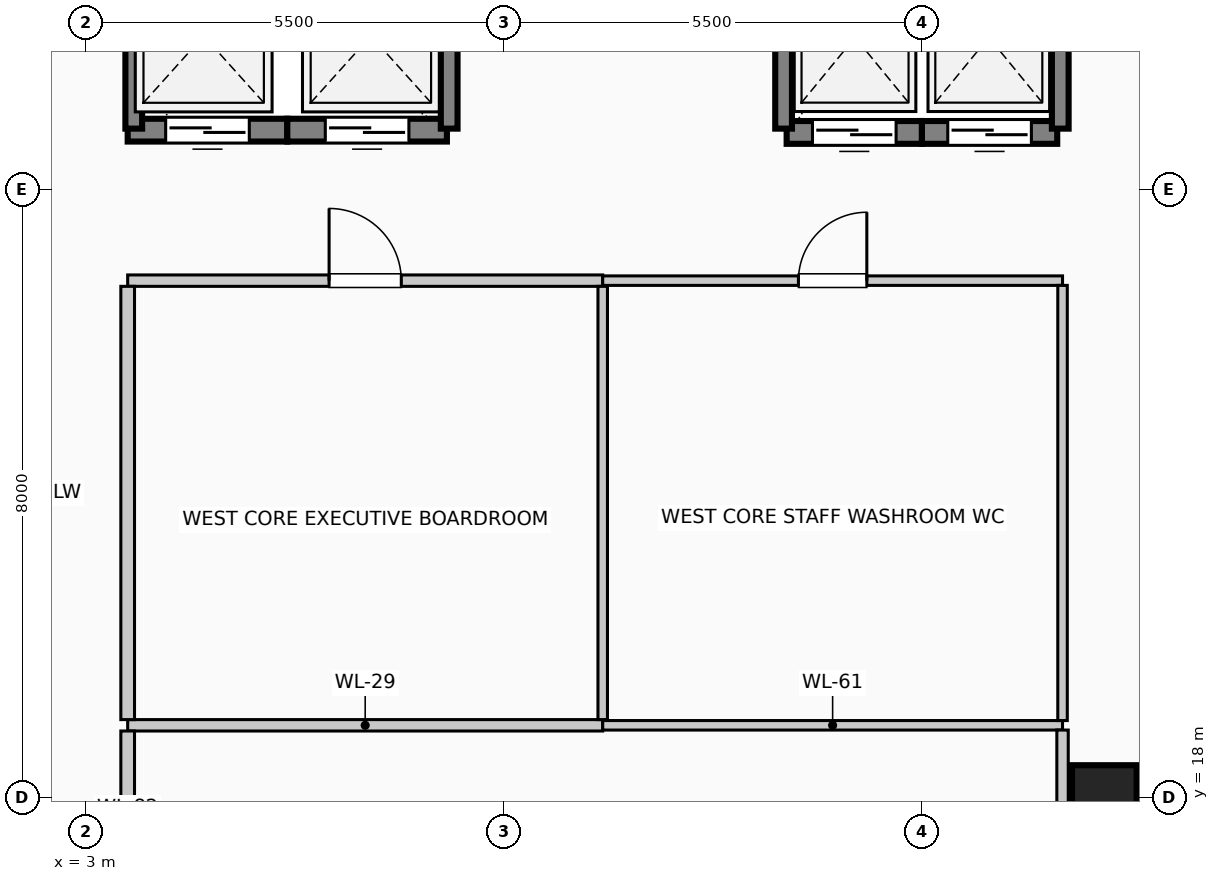
"""IFC4 building model, lengths in metres.
Left out: names, types, materials, properties, quantities, classifications, styles, units other than length and angle.
Written with IfcOpenShell. Run it as: python <this file> out.ifc"""

import sys

from ifc_helpers import new_model, si_unit, direction, frame, frame_2d, origin, origin_2d, place, context, subcontext, project, spatial, rectangle, circle, extrude, element, fill, save


model = new_model("IFC4")
c1 = context("Model", 3, precision=1e-05, world=origin(), true_north=direction((0.0, 1.0)))
c2 = subcontext(c1, "Body", "Model", "MODEL_VIEW")
j1 = project(units=[si_unit("LENGTHUNIT", "METRE"), si_unit("PLANEANGLEUNIT", "RADIAN")], contexts=[c1])
p1 = place(None, origin())
s1 = spatial("IfcSite", under=j1, at=p1, CompositionType="ELEMENT")
p2 = place(p1, origin())
s2 = spatial("IfcBuilding", under=s1, at=p2, CompositionType="ELEMENT")
p3 = place(p2, frame((0.0, 0.0, 165.8)))
s3 = spatial("IfcBuildingStorey", under=s2, at=p3, CompositionType="ELEMENT", Elevation=165.8)
p4 = place(p3, frame((16.4, 18.0, 0.0), z_axis=(0.0, 0.0, 1.0), x_axis=(1.0, 0.0, 0.0)))
e1 = element("IfcColumn", 1, at=p4, inside=s3, PredefinedType="COLUMN", context=c2, shape_type="SweptSolid", body=[
    extrude(circle(Radius=0.425, at=origin_2d()), origin(), (0.0, 0.0, 1.0), 4.8),
])
p5 = place(p3, frame((14.0, 26.75, 0.0), z_axis=(0.0, 0.0, 1.0), x_axis=(-1.0, 0.0, 0.0)))
e2 = element("IfcWall", 2, at=p5, inside=s3, PredefinedType="SOLIDWALL", context=c2, shape_type="SweptSolid", body=[
    extrude(rectangle(XDim=1.78, YDim=0.3, at=frame_2d((0.89, 0.0))), origin(), (0.0, 0.0, 1.0), 4.8),
])
p6 = place(p5, frame((0.34, 0.0, 0.0)))
e3 = element("IfcOpeningElement", 3, at=p6, cuts=e2, PredefinedType="OPENING", context=c2, shape_type="SweptSolid", body=[
    extrude(rectangle(XDim=1.1, YDim=2.2, at=frame_2d((0.55, 1.1))), frame((0.0, 0.16, 0.0), z_axis=(0.0, -1.0, 0.0), x_axis=(1.0, 0.0, 0.0)), (0.0, 0.0, 1.0), 0.32),
])
p7 = place(p3, frame((15.78, 26.75, 0.0), z_axis=(0.0, 0.0, 1.0), x_axis=(-1.0, 0.0, 0.0)))
e4 = element("IfcWall", 4, at=p7, inside=s3, PredefinedType="SOLIDWALL", context=c2, shape_type="SweptSolid", body=[
    extrude(rectangle(XDim=1.78, YDim=0.3, at=frame_2d((0.89, 0.0))), origin(), (0.0, 0.0, 1.0), 4.8),
])
p8 = place(p7, frame((0.34, 0.0, 0.0)))
e5 = element("IfcOpeningElement", 5, at=p8, cuts=e4, PredefinedType="OPENING", context=c2, shape_type="SweptSolid", body=[
    extrude(rectangle(XDim=1.1, YDim=2.2, at=frame_2d((0.55, 1.1))), frame((0.0, 0.16, 0.0), z_axis=(0.0, -1.0, 0.0), x_axis=(1.0, 0.0, 0.0)), (0.0, 0.0, 1.0), 0.32),
])
p9 = place(p3, frame((5.65, 26.78, 0.0), z_axis=(0.0, 0.0, 1.0), x_axis=(-1.0, 0.0, 0.0)))
e6 = element("IfcWall", 6, at=p9, inside=s3, PredefinedType="SOLIDWALL", context=c2, shape_type="SweptSolid", body=[
    extrude(rectangle(XDim=2.1, YDim=0.3, at=frame_2d((1.05, 0.0))), origin(), (0.0, 0.0, 1.0), 4.8),
])
p10 = place(p9, frame((0.5, 0.0, 0.0)))
e7 = element("IfcOpeningElement", 7, at=p10, cuts=e6, PredefinedType="OPENING", context=c2, shape_type="SweptSolid", body=[
    extrude(rectangle(XDim=1.1, YDim=2.2, at=frame_2d((0.55, 1.1))), frame((0.0, 0.16, 0.0), z_axis=(0.0, -1.0, 0.0), x_axis=(1.0, 0.0, 0.0)), (0.0, 0.0, 1.0), 0.32),
])
p11 = place(p3, frame((7.75, 26.78, 0.0), z_axis=(0.0, 0.0, 1.0), x_axis=(-1.0, 0.0, 0.0)))
e8 = element("IfcWall", 8, at=p11, inside=s3, PredefinedType="SOLIDWALL", context=c2, shape_type="SweptSolid", body=[
    extrude(rectangle(XDim=2.1, YDim=0.3, at=frame_2d((1.05, 0.0))), origin(), (0.0, 0.0, 1.0), 4.8),
])
p12 = place(p11, frame((0.5, 0.0, 0.0)))
e9 = element("IfcOpeningElement", 9, at=p12, cuts=e8, PredefinedType="OPENING", context=c2, shape_type="SweptSolid", body=[
    extrude(rectangle(XDim=1.1, YDim=2.2, at=frame_2d((0.55, 1.1))), frame((0.0, 0.16, 0.0), z_axis=(0.0, -1.0, 0.0), x_axis=(1.0, 0.0, 0.0)), (0.0, 0.0, 1.0), 0.32),
])
p13 = place(p3, frame((3.63, 26.8, 0.0), z_axis=(0.0, 0.0, 1.0), x_axis=(0.0, 1.0, 0.0)))
e10 = element("IfcWall", 10, at=p13, inside=s3, PredefinedType="SOLIDWALL", context=c2, shape_type="SweptSolid", body=[
    extrude(rectangle(XDim=5.55, YDim=0.22, at=frame_2d((2.775, 0.0))), origin(), (0.0, 0.0, 1.0), 4.8),
])
p14 = place(p3, frame((7.78, 26.8, 0.0), z_axis=(0.0, 0.0, 1.0), x_axis=(0.0, 1.0, 0.0)))
e11 = element("IfcWall", 11, at=p14, inside=s3, PredefinedType="SOLIDWALL", context=c2, shape_type="SweptSolid", body=[
    extrude(rectangle(XDim=2.8, YDim=0.22, at=frame_2d((1.4, 0.0))), origin(), (0.0, 0.0, 1.0), 4.8),
])
for number, where, z_axis, x_axis in (
    (12, (12.18, 26.8, 0.0), (0.0, 0.0, 1.0), (0.0, 1.0, 0.0)),
    (13, (15.82, 26.8, 0.0), (0.0, 0.0, 1.0), (0.0, 1.0, 0.0)),
):
    element("IfcWall", number, at=place(p3, frame(where, z_axis=z_axis, x_axis=x_axis)), inside=s3, PredefinedType="SOLIDWALL", context=c2, shape_type="SweptSolid", body=[
        extrude(rectangle(XDim=5.45, YDim=0.22, at=frame_2d((2.725, 0.0))), origin(), (0.0, 0.0, 1.0), 4.8),
    ])
p15 = place(p3, frame((3.55, 18.95, 0.0), z_axis=(0.0, 0.0, 1.0), x_axis=(1.0, 0.0, 0.0)))
e14 = element("IfcWall", 14, at=p15, inside=s3, PredefinedType="PARTITIONING", context=c2, shape_type="SweptSolid", body=[
    extrude(rectangle(XDim=6.25, YDim=0.15, at=frame_2d((3.125, 0.0))), origin(), (0.0, 0.0, 1.0), 4.525),
])
p16 = place(p3, frame((9.8, 18.95, 0.0), z_axis=(0.0, 0.0, 1.0), x_axis=(1.0, 0.0, 0.0)))
e15 = element("IfcWall", 15, at=p16, inside=s3, PredefinedType="PARTITIONING", context=c2, shape_type="SweptSolid", body=[
    extrude(rectangle(XDim=6.05, YDim=0.125, at=frame_2d((3.025, 0.0))), origin(), (0.0, 0.0, 1.0), 4.525),
])
p17 = place(p3, frame((3.55, 24.8, 0.0), z_axis=(0.0, 0.0, 1.0), x_axis=(1.0, 0.0, 0.0)))
e16 = element("IfcWall", 16, at=p17, inside=s3, PredefinedType="PARTITIONING", context=c2, shape_type="SweptSolid", body=[
    extrude(rectangle(XDim=6.25, YDim=0.15, at=frame_2d((3.125, 0.0))), origin(), (0.0, 0.0, 1.0), 4.525),
])
p18 = place(p17, frame((2.65, 0.0, 0.0)))
e17 = element("IfcOpeningElement", 17, at=p18, cuts=e16, PredefinedType="OPENING", context=c2, shape_type="SweptSolid", body=[
    extrude(rectangle(XDim=0.95, YDim=2.15, at=frame_2d((0.475, 1.075))), frame((0.0, 0.085, 0.0), z_axis=(0.0, -1.0, 0.0), x_axis=(1.0, 0.0, 0.0)), (0.0, 0.0, 1.0), 0.17),
])
p19 = place(p3, frame((9.8, 24.8, 0.0), z_axis=(0.0, 0.0, 1.0), x_axis=(1.0, 0.0, 0.0)))
e18 = element("IfcWall", 18, at=p19, inside=s3, PredefinedType="PARTITIONING", context=c2, shape_type="SweptSolid", body=[
    extrude(rectangle(XDim=6.05, YDim=0.125, at=frame_2d((3.025, 0.0))), origin(), (0.0, 0.0, 1.0), 4.525),
])
p20 = place(p19, frame((2.575, 0.0, 0.0)))
e19 = element("IfcOpeningElement", 19, at=p20, cuts=e18, PredefinedType="OPENING", context=c2, shape_type="SweptSolid", body=[
    extrude(rectangle(XDim=0.9, YDim=2.1, at=frame_2d((0.45, 1.05))), frame((0.0, 0.073, 0.0), z_axis=(0.0, -1.0, 0.0), x_axis=(1.0, 0.0, 0.0)), (0.0, 0.0, 1.0), 0.145),
])
p21 = place(p3, frame((3.55, 15.74, 0.0), z_axis=(0.0, 0.0, 1.0), x_axis=(0.0, 1.0, 0.0)))
e20 = element("IfcWall", 20, at=p21, inside=s3, PredefinedType="PARTITIONING", context=c2, shape_type="SweptSolid", body=[
    extrude(rectangle(XDim=3.135, YDim=0.18, at=frame_2d((1.567, 0.0))), origin(), (0.0, 0.0, 1.0), 4.525),
])
p22 = place(p3, frame((3.55, 19.025, 0.0), z_axis=(0.0, 0.0, 1.0), x_axis=(0.0, 1.0, 0.0)))
e21 = element("IfcWall", 21, at=p22, inside=s3, PredefinedType="PARTITIONING", context=c2, shape_type="SweptSolid", body=[
    extrude(rectangle(XDim=5.7, YDim=0.18, at=frame_2d((2.85, 0.0))), origin(), (0.0, 0.0, 1.0), 4.525),
])
p23 = place(p3, frame((9.8, 19.025, 0.0), z_axis=(0.0, 0.0, 1.0), x_axis=(0.0, 1.0, 0.0)))
e22 = element("IfcWall", 22, at=p23, inside=s3, PredefinedType="PARTITIONING", context=c2, shape_type="SweptSolid", body=[
    extrude(rectangle(XDim=5.7, YDim=0.125, at=frame_2d((2.85, 0.0))), origin(), (0.0, 0.0, 1.0), 4.525),
])
p24 = place(p3, frame((15.85, 15.74, 0.0), z_axis=(0.0, 0.0, 1.0), x_axis=(0.0, 1.0, 0.0)))
e23 = element("IfcWall", 23, at=p24, inside=s3, PredefinedType="PARTITIONING", context=c2, shape_type="SweptSolid", body=[
    extrude(rectangle(XDim=3.147, YDim=0.15, at=frame_2d((1.574, 0.0))), origin(), (0.0, 0.0, 1.0), 4.525),
])
p25 = place(p3, frame((15.85, 19.012, 0.0), z_axis=(0.0, 0.0, 1.0), x_axis=(0.0, 1.0, 0.0)))
e24 = element("IfcWall", 24, at=p25, inside=s3, PredefinedType="PARTITIONING", context=c2, shape_type="SweptSolid", body=[
    extrude(rectangle(XDim=5.725, YDim=0.125, at=frame_2d((2.863, 0.0))), origin(), (0.0, 0.0, 1.0), 4.525),
])
p26 = place(p6, origin())
e25 = element("IfcDoor", 25, at=p26, inside=s3, OperationType="SLIDING_TO_LEFT", PredefinedType="DOOR", context=c2, shape_type="SweptSolid", body=[
    extrude(rectangle(XDim=1.1, YDim=2.2, at=frame_2d((0.55, 1.1))), frame((0.0, 0.025, 0.0), z_axis=(0.0, -1.0, 0.0), x_axis=(1.0, 0.0, 0.0)), (0.0, 0.0, 1.0), 0.05),
])
fill(e3, e25)
p27 = place(p8, origin())
e26 = element("IfcDoor", 26, at=p27, inside=s3, OperationType="SLIDING_TO_RIGHT", PredefinedType="DOOR", context=c2, shape_type="SweptSolid", body=[
    extrude(rectangle(XDim=1.1, YDim=2.2, at=frame_2d((0.55, 1.1))), frame((0.0, 0.025, 0.0), z_axis=(0.0, -1.0, 0.0), x_axis=(1.0, 0.0, 0.0)), (0.0, 0.0, 1.0), 0.05),
])
fill(e5, e26)
p28 = place(p10, origin())
e27 = element("IfcDoor", 27, at=p28, inside=s3, OperationType="SLIDING_TO_LEFT", PredefinedType="DOOR", context=c2, shape_type="SweptSolid", body=[
    extrude(rectangle(XDim=1.1, YDim=2.2, at=frame_2d((0.55, 1.1))), frame((0.0, 0.025, 0.0), z_axis=(0.0, -1.0, 0.0), x_axis=(1.0, 0.0, 0.0)), (0.0, 0.0, 1.0), 0.05),
])
fill(e7, e27)
p29 = place(p12, origin())
e28 = element("IfcDoor", 28, at=p29, inside=s3, OperationType="SLIDING_TO_RIGHT", PredefinedType="DOOR", context=c2, shape_type="SweptSolid", body=[
    extrude(rectangle(XDim=1.1, YDim=2.2, at=frame_2d((0.55, 1.1))), frame((0.0, 0.025, 0.0), z_axis=(0.0, -1.0, 0.0), x_axis=(1.0, 0.0, 0.0)), (0.0, 0.0, 1.0), 0.05),
])
fill(e9, e28)
p30 = place(p18, origin())
e29 = element("IfcDoor", 29, at=p30, inside=s3, OperationType="SINGLE_SWING_LEFT", PredefinedType="DOOR", context=c2, shape_type="SweptSolid", body=[
    extrude(rectangle(XDim=0.95, YDim=2.15, at=frame_2d((0.475, 1.075))), frame((0.0, 0.025, 0.0), z_axis=(0.0, -1.0, 0.0), x_axis=(1.0, 0.0, 0.0)), (0.0, 0.0, 1.0), 0.05),
])
fill(e17, e29)
p31 = place(p20, origin())
e30 = element("IfcDoor", 30, at=p31, inside=s3, OperationType="SINGLE_SWING_RIGHT", PredefinedType="DOOR", context=c2, shape_type="SweptSolid", body=[
    extrude(rectangle(XDim=0.9, YDim=2.1, at=frame_2d((0.45, 1.05))), frame((0.0, 0.025, 0.0), z_axis=(0.0, -1.0, 0.0), x_axis=(1.0, 0.0, 0.0)), (0.0, 0.0, 1.0), 0.05),
])
fill(e19, e30)
save(model, sys.argv[1])
